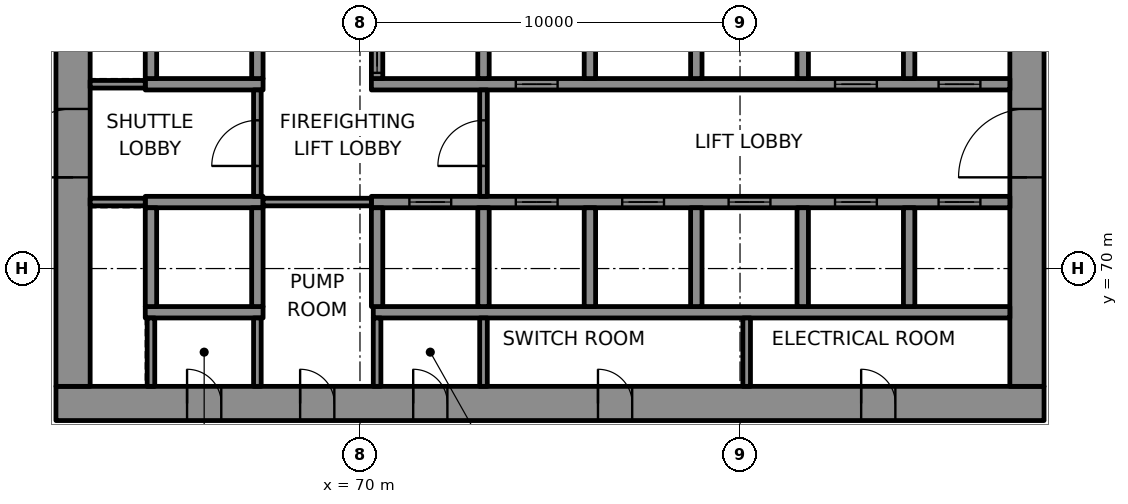
"""IFC4 building model, lengths in metres.
Left out: names, types, materials, properties, quantities, classifications, styles, units other than length and angle.
Written with IfcOpenShell. Run it as: python <this file> out.ifc"""

import sys

from ifc_helpers import new_model, si_unit, direction, frame, frame_2d, origin, place, context, subcontext, project, spatial, rectangle, extrude, element, fill, save


model = new_model("IFC4")
c1 = context("Model", 3, precision=1e-05, world=origin(), true_north=direction((0.0, 1.0)))
c2 = subcontext(c1, "Body", "Model", "MODEL_VIEW")
j1 = project(units=[si_unit("LENGTHUNIT", "METRE"), si_unit("PLANEANGLEUNIT", "RADIAN")], contexts=[c1])
p1 = place(None, origin())
s1 = spatial("IfcSite", under=j1, at=p1, CompositionType="ELEMENT")
p2 = place(p1, origin())
s2 = spatial("IfcBuilding", under=s1, at=p2, CompositionType="ELEMENT")
p3 = place(p2, frame((0.0, 0.0, 124.0)))
s3 = spatial("IfcBuildingStorey", under=s2, at=p3, CompositionType="ELEMENT", Elevation=124.0)
p4 = place(p3, frame((62.0, 66.45, 0.0), z_axis=(0.0, 0.0, 1.0), x_axis=(1.0, 0.0, 0.0)))
e1 = element("IfcWall", 1, at=p4, inside=s3, PredefinedType="SHEAR", context=c2, shape_type="SweptSolid", body=[
    extrude(rectangle(XDim=26.0, YDim=0.9, at=frame_2d((13.0, 0.0))), origin(), (0.0, 0.0, 1.0), 4.0),
])
p5 = place(p4, frame((3.45, 0.0, 0.0)))
e2 = element("IfcOpeningElement", 2, at=p5, cuts=e1, PredefinedType="OPENING", context=c2, shape_type="SweptSolid", body=[
    extrude(rectangle(XDim=0.9, YDim=2.1, at=frame_2d((0.45, 1.05))), frame((0.0, 0.46, 0.0), z_axis=(0.0, -1.0, 0.0), x_axis=(1.0, 0.0, 0.0)), (0.0, 0.0, 1.0), 0.92),
])
p6 = place(p4, frame((6.425, 0.0, 0.0)))
e3 = element("IfcOpeningElement", 3, at=p6, cuts=e1, PredefinedType="OPENING", context=c2, shape_type="SweptSolid", body=[
    extrude(rectangle(XDim=0.9, YDim=2.1, at=frame_2d((0.45, 1.05))), frame((0.0, 0.46, 0.0), z_axis=(0.0, -1.0, 0.0), x_axis=(1.0, 0.0, 0.0)), (0.0, 0.0, 1.0), 0.92),
])
p7 = place(p4, frame((9.4, 0.0, 0.0)))
e4 = element("IfcOpeningElement", 4, at=p7, cuts=e1, PredefinedType="OPENING", context=c2, shape_type="SweptSolid", body=[
    extrude(rectangle(XDim=0.9, YDim=2.1, at=frame_2d((0.45, 1.05))), frame((0.0, 0.46, 0.0), z_axis=(0.0, -1.0, 0.0), x_axis=(1.0, 0.0, 0.0)), (0.0, 0.0, 1.0), 0.92),
])
p8 = place(p4, frame((14.262, 0.0, 0.0)))
e5 = element("IfcOpeningElement", 5, at=p8, cuts=e1, PredefinedType="OPENING", context=c2, shape_type="SweptSolid", body=[
    extrude(rectangle(XDim=0.9, YDim=2.1, at=frame_2d((0.45, 1.05))), frame((0.0, 0.46, 0.0), z_axis=(0.0, -1.0, 0.0), x_axis=(1.0, 0.0, 0.0)), (0.0, 0.0, 1.0), 0.92),
])
p9 = place(p4, frame((21.188, 0.0, 0.0)))
e6 = element("IfcOpeningElement", 6, at=p9, cuts=e1, PredefinedType="OPENING", context=c2, shape_type="SweptSolid", body=[
    extrude(rectangle(XDim=0.9, YDim=2.1, at=frame_2d((0.45, 1.05))), frame((0.0, 0.46, 0.0), z_axis=(0.0, -1.0, 0.0), x_axis=(1.0, 0.0, 0.0)), (0.0, 0.0, 1.0), 0.92),
])
p10 = place(p3, frame((62.45, 66.9, 0.0), z_axis=(0.0, 0.0, 1.0), x_axis=(0.0, 1.0, 0.0)))
e7 = element("IfcWall", 7, at=p10, inside=s3, PredefinedType="SHEAR", context=c2, shape_type="SweptSolid", body=[
    extrude(rectangle(XDim=16.2, YDim=0.9, at=frame_2d((8.1, 0.0))), origin(), (0.0, 0.0, 1.0), 4.0),
])
p11 = place(p10, frame((5.5, 0.0, 0.0)))
e8 = element("IfcOpeningElement", 8, at=p11, cuts=e7, PredefinedType="OPENING", context=c2, shape_type="SweptSolid", body=[
    extrude(rectangle(XDim=1.8, YDim=2.1, at=frame_2d((0.9, 1.05))), frame((0.0, 0.46, 0.0), z_axis=(0.0, -1.0, 0.0), x_axis=(1.0, 0.0, 0.0)), (0.0, 0.0, 1.0), 0.92),
])
p12 = place(p3, frame((87.55, 66.9, 0.0), z_axis=(0.0, 0.0, 1.0), x_axis=(0.0, 1.0, 0.0)))
e9 = element("IfcWall", 9, at=p12, inside=s3, PredefinedType="SHEAR", context=c2, shape_type="SweptSolid", body=[
    extrude(rectangle(XDim=16.2, YDim=0.9, at=frame_2d((8.1, 0.0))), origin(), (0.0, 0.0, 1.0), 4.0),
])
p13 = place(p12, frame((5.5, 0.0, 0.0)))
e10 = element("IfcOpeningElement", 10, at=p13, cuts=e9, PredefinedType="OPENING", context=c2, shape_type="SweptSolid", body=[
    extrude(rectangle(XDim=1.8, YDim=2.1, at=frame_2d((0.9, 1.05))), frame((0.0, 0.46, 0.0), z_axis=(0.0, -1.0, 0.0), x_axis=(1.0, 0.0, 0.0)), (0.0, 0.0, 1.0), 0.92),
])
p14 = place(p12, frame((11.738, 0.0, 0.0)))
e11 = element("IfcOpeningElement", 11, at=p14, cuts=e9, PredefinedType="OPENING", context=c2, shape_type="SweptSolid", body=[
    extrude(rectangle(XDim=0.9, YDim=2.1, at=frame_2d((0.45, 1.05))), frame((0.0, 0.46, 0.0), z_axis=(0.0, -1.0, 0.0), x_axis=(1.0, 0.0, 0.0)), (0.0, 0.0, 1.0), 0.92),
])
p15 = place(p3, frame((64.35, 68.85, 0.0), z_axis=(0.0, 0.0, 1.0), x_axis=(1.0, 0.0, 0.0)))
e12 = element("IfcWall", 12, at=p15, inside=s3, PredefinedType="SHEAR", context=c2, shape_type="SweptSolid", body=[
    extrude(rectangle(XDim=3.1, YDim=0.3, at=frame_2d((1.55, 0.0))), origin(), (0.0, 0.0, 1.0), 4.0),
])
p16 = place(p3, frame((70.35, 68.85, 0.0), z_axis=(0.0, 0.0, 1.0), x_axis=(1.0, 0.0, 0.0)))
e13 = element("IfcWall", 13, at=p16, inside=s3, PredefinedType="SHEAR", context=c2, shape_type="SweptSolid", body=[
    extrude(rectangle(XDim=16.75, YDim=0.3, at=frame_2d((8.375, 0.0))), origin(), (0.0, 0.0, 1.0), 4.0),
])
p17 = place(p3, frame((64.35, 71.75, 0.0), z_axis=(0.0, 0.0, 1.0), x_axis=(1.0, 0.0, 0.0)))
e14 = element("IfcWall", 14, at=p17, inside=s3, PredefinedType="SHEAR", context=c2, shape_type="SweptSolid", body=[
    extrude(rectangle(XDim=3.1, YDim=0.3, at=frame_2d((1.55, 0.0))), origin(), (0.0, 0.0, 1.0), 4.0),
])
p18 = place(p3, frame((70.3, 71.75, 0.0), z_axis=(0.0, 0.0, 1.0), x_axis=(1.0, 0.0, 0.0)))
e15 = element("IfcWall", 15, at=p18, inside=s3, PredefinedType="SHEAR", context=c2, shape_type="SweptSolid", body=[
    extrude(rectangle(XDim=16.8, YDim=0.3, at=frame_2d((8.4, 0.0))), origin(), (0.0, 0.0, 1.0), 4.0),
])
p19 = place(p18, frame((1.0, 0.0, 0.0)))
e16 = element("IfcOpeningElement", 16, at=p19, cuts=e15, PredefinedType="OPENING", context=c2, shape_type="SweptSolid", body=[
    extrude(rectangle(XDim=1.1, YDim=2.1, at=frame_2d((0.55, 1.05))), frame((0.0, 0.16, 0.0), z_axis=(0.0, -1.0, 0.0), x_axis=(1.0, 0.0, 0.0)), (0.0, 0.0, 1.0), 0.32),
])
p20 = place(p18, frame((3.8, 0.0, 0.0)))
e17 = element("IfcOpeningElement", 17, at=p20, cuts=e15, PredefinedType="OPENING", context=c2, shape_type="SweptSolid", body=[
    extrude(rectangle(XDim=1.1, YDim=2.1, at=frame_2d((0.55, 1.05))), frame((0.0, 0.16, 0.0), z_axis=(0.0, -1.0, 0.0), x_axis=(1.0, 0.0, 0.0)), (0.0, 0.0, 1.0), 0.32),
])
p21 = place(p18, frame((6.6, 0.0, 0.0)))
e18 = element("IfcOpeningElement", 18, at=p21, cuts=e15, PredefinedType="OPENING", context=c2, shape_type="SweptSolid", body=[
    extrude(rectangle(XDim=1.1, YDim=2.1, at=frame_2d((0.55, 1.05))), frame((0.0, 0.16, 0.0), z_axis=(0.0, -1.0, 0.0), x_axis=(1.0, 0.0, 0.0)), (0.0, 0.0, 1.0), 0.32),
])
p22 = place(p18, frame((9.4, 0.0, 0.0)))
e19 = element("IfcOpeningElement", 19, at=p22, cuts=e15, PredefinedType="OPENING", context=c2, shape_type="SweptSolid", body=[
    extrude(rectangle(XDim=1.1, YDim=2.1, at=frame_2d((0.55, 1.05))), frame((0.0, 0.16, 0.0), z_axis=(0.0, -1.0, 0.0), x_axis=(1.0, 0.0, 0.0)), (0.0, 0.0, 1.0), 0.32),
])
p23 = place(p18, frame((12.2, 0.0, 0.0)))
e20 = element("IfcOpeningElement", 20, at=p23, cuts=e15, PredefinedType="OPENING", context=c2, shape_type="SweptSolid", body=[
    extrude(rectangle(XDim=1.1, YDim=2.1, at=frame_2d((0.55, 1.05))), frame((0.0, 0.16, 0.0), z_axis=(0.0, -1.0, 0.0), x_axis=(1.0, 0.0, 0.0)), (0.0, 0.0, 1.0), 0.32),
])
p24 = place(p18, frame((14.925, 0.0, 0.0)))
e21 = element("IfcOpeningElement", 21, at=p24, cuts=e15, PredefinedType="OPENING", context=c2, shape_type="SweptSolid", body=[
    extrude(rectangle(XDim=1.1, YDim=2.1, at=frame_2d((0.55, 1.05))), frame((0.0, 0.16, 0.0), z_axis=(0.0, -1.0, 0.0), x_axis=(1.0, 0.0, 0.0)), (0.0, 0.0, 1.0), 0.32),
])
p25 = place(p3, frame((64.35, 74.85, 0.0), z_axis=(0.0, 0.0, 1.0), x_axis=(1.0, 0.0, 0.0)))
e22 = element("IfcWall", 22, at=p25, inside=s3, PredefinedType="SHEAR", context=c2, shape_type="SweptSolid", body=[
    extrude(rectangle(XDim=3.1, YDim=0.3, at=frame_2d((1.55, 0.0))), origin(), (0.0, 0.0, 1.0), 4.0),
])
p26 = place(p3, frame((70.3, 74.85, 0.0), z_axis=(0.0, 0.0, 1.0), x_axis=(1.0, 0.0, 0.0)))
e23 = element("IfcWall", 23, at=p26, inside=s3, PredefinedType="SHEAR", context=c2, shape_type="SweptSolid", body=[
    extrude(rectangle(XDim=16.8, YDim=0.3, at=frame_2d((8.4, 0.0))), origin(), (0.0, 0.0, 1.0), 4.0),
])
p27 = place(p26, frame((3.8, 0.0, 0.0)))
e24 = element("IfcOpeningElement", 24, at=p27, cuts=e23, PredefinedType="OPENING", context=c2, shape_type="SweptSolid", body=[
    extrude(rectangle(XDim=1.1, YDim=2.1, at=frame_2d((0.55, 1.05))), frame((0.0, 0.16, 0.0), z_axis=(0.0, -1.0, 0.0), x_axis=(1.0, 0.0, 0.0)), (0.0, 0.0, 1.0), 0.32),
])
p28 = place(p26, frame((12.2, 0.0, 0.0)))
e25 = element("IfcOpeningElement", 25, at=p28, cuts=e23, PredefinedType="OPENING", context=c2, shape_type="SweptSolid", body=[
    extrude(rectangle(XDim=1.1, YDim=2.1, at=frame_2d((0.55, 1.05))), frame((0.0, 0.16, 0.0), z_axis=(0.0, -1.0, 0.0), x_axis=(1.0, 0.0, 0.0)), (0.0, 0.0, 1.0), 0.32),
])
p29 = place(p26, frame((14.925, 0.0, 0.0)))
e26 = element("IfcOpeningElement", 26, at=p29, cuts=e23, PredefinedType="OPENING", context=c2, shape_type="SweptSolid", body=[
    extrude(rectangle(XDim=1.1, YDim=2.1, at=frame_2d((0.55, 1.05))), frame((0.0, 0.16, 0.0), z_axis=(0.0, -1.0, 0.0), x_axis=(1.0, 0.0, 0.0)), (0.0, 0.0, 1.0), 0.32),
])
for number, where, z_axis, x_axis in (
    (27, (64.5, 69.0, 0.0), (0.0, 0.0, 1.0), (0.0, 1.0, 0.0)),
    (28, (64.5, 75.0, 0.0), (0.0, 0.0, 1.0), (0.0, 1.0, 0.0)),
    (29, (67.3, 69.0, 0.0), (0.0, 0.0, 1.0), (0.0, 1.0, 0.0)),
    (30, (67.3, 75.0, 0.0), (0.0, 0.0, 1.0), (0.0, 1.0, 0.0)),
    (31, (70.45, 69.0, 0.0), (0.0, 0.0, 1.0), (0.0, 1.0, 0.0)),
):
    element("IfcWall", number, at=place(p3, frame(where, z_axis=z_axis, x_axis=x_axis)), inside=s3, PredefinedType="SHEAR", context=c2, shape_type="SweptSolid", body=[
        extrude(rectangle(XDim=2.6, YDim=0.3, at=frame_2d((1.3, 0.0))), origin(), (0.0, 0.0, 1.0), 4.0),
    ])
p30 = place(p3, frame((70.45, 75.0, 0.0), z_axis=(0.0, 0.0, 1.0), x_axis=(0.0, 1.0, 0.0)))
e32 = element("IfcWall", 32, at=p30, inside=s3, PredefinedType="SHEAR", context=c2, shape_type="SweptSolid", body=[
    extrude(rectangle(XDim=2.6, YDim=0.3, at=frame_2d((1.3, 0.0))), origin(), (0.0, 0.0, 1.0), 4.0),
])
p31 = place(p30, frame((0.15, 0.0, 0.0)))
e33 = element("IfcOpeningElement", 33, at=p31, cuts=e32, PredefinedType="OPENING", context=c2, shape_type="SweptSolid", body=[
    extrude(rectangle(XDim=1.1, YDim=2.1, at=frame_2d((0.55, 1.05))), frame((0.0, 0.16, 0.0), z_axis=(0.0, -1.0, 0.0), x_axis=(1.0, 0.0, 0.0)), (0.0, 0.0, 1.0), 0.32),
])
for number, where, z_axis, x_axis in (
    (34, (73.25, 69.0, 0.0), (0.0, 0.0, 1.0), (0.0, 1.0, 0.0)),
    (35, (73.25, 75.0, 0.0), (0.0, 0.0, 1.0), (0.0, 1.0, 0.0)),
    (36, (76.05, 69.0, 0.0), (0.0, 0.0, 1.0), (0.0, 1.0, 0.0)),
    (37, (76.05, 75.0, 0.0), (0.0, 0.0, 1.0), (0.0, 1.0, 0.0)),
    (38, (78.85, 69.0, 0.0), (0.0, 0.0, 1.0), (0.0, 1.0, 0.0)),
    (39, (78.85, 75.0, 0.0), (0.0, 0.0, 1.0), (0.0, 1.0, 0.0)),
    (40, (81.65, 69.0, 0.0), (0.0, 0.0, 1.0), (0.0, 1.0, 0.0)),
    (41, (81.65, 75.0, 0.0), (0.0, 0.0, 1.0), (0.0, 1.0, 0.0)),
    (42, (84.45, 69.0, 0.0), (0.0, 0.0, 1.0), (0.0, 1.0, 0.0)),
    (43, (84.45, 75.0, 0.0), (0.0, 0.0, 1.0), (0.0, 1.0, 0.0)),
):
    element("IfcWall", number, at=place(p3, frame(where, z_axis=z_axis, x_axis=x_axis)), inside=s3, PredefinedType="SHEAR", context=c2, shape_type="SweptSolid", body=[
        extrude(rectangle(XDim=2.6, YDim=0.3, at=frame_2d((1.3, 0.0))), origin(), (0.0, 0.0, 1.0), 4.0),
    ])
p32 = place(p3, frame((62.9, 71.75, 0.0), z_axis=(0.0, 0.0, 1.0), x_axis=(1.0, 0.0, 0.0)))
e44 = element("IfcWall", 44, at=p32, inside=s3, PredefinedType="PARTITIONING", context=c2, shape_type="SweptSolid", body=[
    extrude(rectangle(XDim=1.45, YDim=0.2, at=frame_2d((0.725, 0.0))), origin(), (0.0, 0.0, 1.0), 4.0),
])
p33 = place(p3, frame((67.45, 71.75, 0.0), z_axis=(0.0, 0.0, 1.0), x_axis=(1.0, 0.0, 0.0)))
e45 = element("IfcWall", 45, at=p33, inside=s3, PredefinedType="PARTITIONING", context=c2, shape_type="SweptSolid", body=[
    extrude(rectangle(XDim=2.85, YDim=0.2, at=frame_2d((1.425, 0.0))), origin(), (0.0, 0.0, 1.0), 4.0),
])
p34 = place(p3, frame((62.9, 74.85, 0.0), z_axis=(0.0, 0.0, 1.0), x_axis=(1.0, 0.0, 0.0)))
e46 = element("IfcWall", 46, at=p34, inside=s3, PredefinedType="PARTITIONING", context=c2, shape_type="SweptSolid", body=[
    extrude(rectangle(XDim=1.45, YDim=0.2, at=frame_2d((0.725, 0.0))), origin(), (0.0, 0.0, 1.0), 4.0),
])
for number, where, z_axis, x_axis in (
    (47, (64.5, 66.9, 0.0), (0.0, 0.0, 1.0), (0.0, 1.0, 0.0)),
    (48, (67.3, 66.9, 0.0), (0.0, 0.0, 1.0), (0.0, 1.0, 0.0)),
):
    element("IfcWall", number, at=place(p3, frame(where, z_axis=z_axis, x_axis=x_axis)), inside=s3, PredefinedType="PARTITIONING", context=c2, shape_type="SweptSolid", body=[
        extrude(rectangle(XDim=1.8, YDim=0.2, at=frame_2d((0.9, 0.0))), origin(), (0.0, 0.0, 1.0), 4.0),
    ])
p35 = place(p3, frame((67.3, 71.9, 0.0), z_axis=(0.0, 0.0, 1.0), x_axis=(0.0, 1.0, 0.0)))
e49 = element("IfcWall", 49, at=p35, inside=s3, PredefinedType="PARTITIONING", context=c2, shape_type="SweptSolid", body=[
    extrude(rectangle(XDim=2.8, YDim=0.2, at=frame_2d((1.4, 0.0))), origin(), (0.0, 0.0, 1.0), 4.0),
])
p36 = place(p35, frame((0.8, 0.0, 0.0)))
e50 = element("IfcOpeningElement", 50, at=p36, cuts=e49, PredefinedType="OPENING", context=c2, shape_type="SweptSolid", body=[
    extrude(rectangle(XDim=1.2, YDim=2.1, at=frame_2d((0.6, 1.05))), frame((0.0, 0.11, 0.0), z_axis=(0.0, -1.0, 0.0), x_axis=(1.0, 0.0, 0.0)), (0.0, 0.0, 1.0), 0.22),
])
for number, where, z_axis, x_axis in (
    (51, (70.45, 66.9, 0.0), (0.0, 0.0, 1.0), (0.0, 1.0, 0.0)),
    (52, (73.25, 66.9, 0.0), (0.0, 0.0, 1.0), (0.0, 1.0, 0.0)),
):
    element("IfcWall", number, at=place(p3, frame(where, z_axis=z_axis, x_axis=x_axis)), inside=s3, PredefinedType="PARTITIONING", context=c2, shape_type="SweptSolid", body=[
        extrude(rectangle(XDim=1.8, YDim=0.2, at=frame_2d((0.9, 0.0))), origin(), (0.0, 0.0, 1.0), 4.0),
    ])
p37 = place(p3, frame((73.25, 71.9, 0.0), z_axis=(0.0, 0.0, 1.0), x_axis=(0.0, 1.0, 0.0)))
e53 = element("IfcWall", 53, at=p37, inside=s3, PredefinedType="PARTITIONING", context=c2, shape_type="SweptSolid", body=[
    extrude(rectangle(XDim=2.8, YDim=0.2, at=frame_2d((1.4, 0.0))), origin(), (0.0, 0.0, 1.0), 4.0),
])
p38 = place(p37, frame((0.8, 0.0, 0.0)))
e54 = element("IfcOpeningElement", 54, at=p38, cuts=e53, PredefinedType="OPENING", context=c2, shape_type="SweptSolid", body=[
    extrude(rectangle(XDim=1.2, YDim=2.1, at=frame_2d((0.6, 1.05))), frame((0.0, 0.11, 0.0), z_axis=(0.0, -1.0, 0.0), x_axis=(1.0, 0.0, 0.0)), (0.0, 0.0, 1.0), 0.22),
])
p39 = place(p3, frame((80.175, 66.9, 0.0), z_axis=(0.0, 0.0, 1.0), x_axis=(0.0, 1.0, 0.0)))
e55 = element("IfcWall", 55, at=p39, inside=s3, PredefinedType="PARTITIONING", context=c2, shape_type="SweptSolid", body=[
    extrude(rectangle(XDim=1.8, YDim=0.2, at=frame_2d((0.9, 0.0))), origin(), (0.0, 0.0, 1.0), 4.0),
])
p40 = place(p19, origin())
e56 = element("IfcDoor", 56, at=p40, inside=s3, OperationType="DOUBLE_DOOR_SLIDING", PredefinedType="DOOR", context=c2, shape_type="SweptSolid", body=[
    extrude(rectangle(XDim=1.1, YDim=2.1, at=frame_2d((0.55, 1.05))), frame((0.0, 0.025, 0.0), z_axis=(0.0, -1.0, 0.0), x_axis=(1.0, 0.0, 0.0)), (0.0, 0.0, 1.0), 0.05),
])
fill(e16, e56)
p41 = place(p20, origin())
e57 = element("IfcDoor", 57, at=p41, inside=s3, OperationType="DOUBLE_DOOR_SLIDING", PredefinedType="DOOR", context=c2, shape_type="SweptSolid", body=[
    extrude(rectangle(XDim=1.1, YDim=2.1, at=frame_2d((0.55, 1.05))), frame((0.0, 0.025, 0.0), z_axis=(0.0, -1.0, 0.0), x_axis=(1.0, 0.0, 0.0)), (0.0, 0.0, 1.0), 0.05),
])
fill(e17, e57)
p42 = place(p21, origin())
e58 = element("IfcDoor", 58, at=p42, inside=s3, OperationType="DOUBLE_DOOR_SLIDING", PredefinedType="DOOR", context=c2, shape_type="SweptSolid", body=[
    extrude(rectangle(XDim=1.1, YDim=2.1, at=frame_2d((0.55, 1.05))), frame((0.0, 0.025, 0.0), z_axis=(0.0, -1.0, 0.0), x_axis=(1.0, 0.0, 0.0)), (0.0, 0.0, 1.0), 0.05),
])
fill(e18, e58)
p43 = place(p22, origin())
e59 = element("IfcDoor", 59, at=p43, inside=s3, OperationType="DOUBLE_DOOR_SLIDING", PredefinedType="DOOR", context=c2, shape_type="SweptSolid", body=[
    extrude(rectangle(XDim=1.1, YDim=2.1, at=frame_2d((0.55, 1.05))), frame((0.0, 0.025, 0.0), z_axis=(0.0, -1.0, 0.0), x_axis=(1.0, 0.0, 0.0)), (0.0, 0.0, 1.0), 0.05),
])
fill(e19, e59)
p44 = place(p23, origin())
e60 = element("IfcDoor", 60, at=p44, inside=s3, OperationType="DOUBLE_DOOR_SLIDING", PredefinedType="DOOR", context=c2, shape_type="SweptSolid", body=[
    extrude(rectangle(XDim=1.1, YDim=2.1, at=frame_2d((0.55, 1.05))), frame((0.0, 0.025, 0.0), z_axis=(0.0, -1.0, 0.0), x_axis=(1.0, 0.0, 0.0)), (0.0, 0.0, 1.0), 0.05),
])
fill(e20, e60)
p45 = place(p24, origin())
e61 = element("IfcDoor", 61, at=p45, inside=s3, OperationType="DOUBLE_DOOR_SLIDING", PredefinedType="DOOR", context=c2, shape_type="SweptSolid", body=[
    extrude(rectangle(XDim=1.1, YDim=2.1, at=frame_2d((0.55, 1.05))), frame((0.0, 0.025, 0.0), z_axis=(0.0, -1.0, 0.0), x_axis=(1.0, 0.0, 0.0)), (0.0, 0.0, 1.0), 0.05),
])
fill(e21, e61)
p46 = place(p31, origin())
e62 = element("IfcDoor", 62, at=p46, inside=s3, OperationType="DOUBLE_DOOR_SLIDING", PredefinedType="DOOR", context=c2, shape_type="SweptSolid", body=[
    extrude(rectangle(XDim=1.1, YDim=2.1, at=frame_2d((0.55, 1.05))), frame((0.0, 0.025, 0.0), z_axis=(0.0, -1.0, 0.0), x_axis=(1.0, 0.0, 0.0)), (0.0, 0.0, 1.0), 0.05),
])
fill(e33, e62)
p47 = place(p27, origin())
e63 = element("IfcDoor", 63, at=p47, inside=s3, OperationType="DOUBLE_DOOR_SLIDING", PredefinedType="DOOR", context=c2, shape_type="SweptSolid", body=[
    extrude(rectangle(XDim=1.1, YDim=2.1, at=frame_2d((0.55, 1.05))), frame((0.0, 0.025, 0.0), z_axis=(0.0, -1.0, 0.0), x_axis=(1.0, 0.0, 0.0)), (0.0, 0.0, 1.0), 0.05),
])
fill(e24, e63)
p48 = place(p28, origin())
e64 = element("IfcDoor", 64, at=p48, inside=s3, OperationType="DOUBLE_DOOR_SLIDING", PredefinedType="DOOR", context=c2, shape_type="SweptSolid", body=[
    extrude(rectangle(XDim=1.1, YDim=2.1, at=frame_2d((0.55, 1.05))), frame((0.0, 0.025, 0.0), z_axis=(0.0, -1.0, 0.0), x_axis=(1.0, 0.0, 0.0)), (0.0, 0.0, 1.0), 0.05),
])
fill(e25, e64)
p49 = place(p29, origin())
e65 = element("IfcDoor", 65, at=p49, inside=s3, OperationType="DOUBLE_DOOR_SLIDING", PredefinedType="DOOR", context=c2, shape_type="SweptSolid", body=[
    extrude(rectangle(XDim=1.1, YDim=2.1, at=frame_2d((0.55, 1.05))), frame((0.0, 0.025, 0.0), z_axis=(0.0, -1.0, 0.0), x_axis=(1.0, 0.0, 0.0)), (0.0, 0.0, 1.0), 0.05),
])
fill(e26, e65)
p50 = place(p38, origin())
e66 = element("IfcDoor", 66, at=p50, inside=s3, OperationType="SINGLE_SWING_LEFT", PredefinedType="DOOR", context=c2, shape_type="SweptSolid", body=[
    extrude(rectangle(XDim=1.2, YDim=2.1, at=frame_2d((0.6, 1.05))), frame((0.0, 0.025, 0.0), z_axis=(0.0, -1.0, 0.0), x_axis=(1.0, 0.0, 0.0)), (0.0, 0.0, 1.0), 0.05),
])
fill(e54, e66)
p51 = place(p36, origin())
e67 = element("IfcDoor", 67, at=p51, inside=s3, OperationType="SINGLE_SWING_RIGHT", PredefinedType="DOOR", context=c2, shape_type="SweptSolid", body=[
    extrude(rectangle(XDim=1.2, YDim=2.1, at=frame_2d((0.6, 1.05))), frame((0.0, 0.025, 0.0), z_axis=(0.0, -1.0, 0.0), x_axis=(1.0, 0.0, 0.0)), (0.0, 0.0, 1.0), 0.05),
])
fill(e50, e67)
p52 = place(p11, origin())
e68 = element("IfcDoor", 68, at=p52, inside=s3, OperationType="SINGLE_SWING_LEFT", PredefinedType="DOOR", context=c2, shape_type="SweptSolid", body=[
    extrude(rectangle(XDim=1.8, YDim=2.1, at=frame_2d((0.9, 1.05))), frame((0.0, 0.17, 0.0), z_axis=(0.0, -1.0, 0.0), x_axis=(1.0, 0.0, 0.0)), (0.0, 0.0, 1.0), 0.34),
])
fill(e8, e68)
p53 = place(p13, origin())
e69 = element("IfcDoor", 69, at=p53, inside=s3, OperationType="SINGLE_SWING_RIGHT", PredefinedType="DOOR", context=c2, shape_type="SweptSolid", body=[
    extrude(rectangle(XDim=1.8, YDim=2.1, at=frame_2d((0.9, 1.05))), frame((0.0, 0.17, 0.0), z_axis=(0.0, -1.0, 0.0), x_axis=(1.0, 0.0, 0.0)), (0.0, 0.0, 1.0), 0.34),
])
fill(e10, e69)
p54 = place(p5, origin())
e70 = element("IfcDoor", 70, at=p54, inside=s3, OperationType="SINGLE_SWING_LEFT", PredefinedType="DOOR", context=c2, shape_type="SweptSolid", body=[
    extrude(rectangle(XDim=0.9, YDim=2.1, at=frame_2d((0.45, 1.05))), frame((0.0, 0.17, 0.0), z_axis=(0.0, -1.0, 0.0), x_axis=(1.0, 0.0, 0.0)), (0.0, 0.0, 1.0), 0.34),
])
fill(e2, e70)
p55 = place(p6, origin())
e71 = element("IfcDoor", 71, at=p55, inside=s3, OperationType="SINGLE_SWING_RIGHT", PredefinedType="DOOR", context=c2, shape_type="SweptSolid", body=[
    extrude(rectangle(XDim=0.9, YDim=2.1, at=frame_2d((0.45, 1.05))), frame((0.0, 0.17, 0.0), z_axis=(0.0, -1.0, 0.0), x_axis=(1.0, 0.0, 0.0)), (0.0, 0.0, 1.0), 0.34),
])
fill(e3, e71)
p56 = place(p7, origin())
e72 = element("IfcDoor", 72, at=p56, inside=s3, OperationType="SINGLE_SWING_LEFT", PredefinedType="DOOR", context=c2, shape_type="SweptSolid", body=[
    extrude(rectangle(XDim=0.9, YDim=2.1, at=frame_2d((0.45, 1.05))), frame((0.0, 0.17, 0.0), z_axis=(0.0, -1.0, 0.0), x_axis=(1.0, 0.0, 0.0)), (0.0, 0.0, 1.0), 0.34),
])
fill(e4, e72)
p57 = place(p8, origin())
e73 = element("IfcDoor", 73, at=p57, inside=s3, OperationType="SINGLE_SWING_RIGHT", PredefinedType="DOOR", context=c2, shape_type="SweptSolid", body=[
    extrude(rectangle(XDim=0.9, YDim=2.1, at=frame_2d((0.45, 1.05))), frame((0.0, 0.17, 0.0), z_axis=(0.0, -1.0, 0.0), x_axis=(1.0, 0.0, 0.0)), (0.0, 0.0, 1.0), 0.34),
])
fill(e5, e73)
p58 = place(p9, origin())
e74 = element("IfcDoor", 74, at=p58, inside=s3, OperationType="SINGLE_SWING_LEFT", PredefinedType="DOOR", context=c2, shape_type="SweptSolid", body=[
    extrude(rectangle(XDim=0.9, YDim=2.1, at=frame_2d((0.45, 1.05))), frame((0.0, 0.17, 0.0), z_axis=(0.0, -1.0, 0.0), x_axis=(1.0, 0.0, 0.0)), (0.0, 0.0, 1.0), 0.34),
])
fill(e6, e74)
save(model, sys.argv[1])
